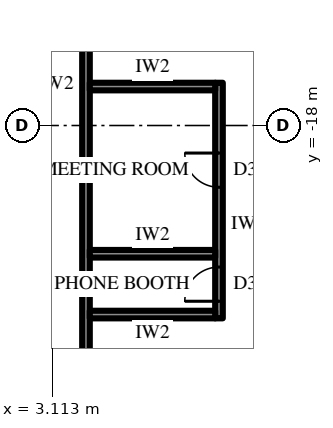
"""IFC4 building model, lengths in metres.
Left out: names, types, materials, properties, quantities, classifications, styles, units other than length and angle.
Written with IfcOpenShell. Run it as: python <this file> out.ifc"""

import sys

from ifc_helpers import new_model, si_unit, direction, frame, frame_2d, origin, place, context, subcontext, project, spatial, rectangle, extrude, element, fill, save


model = new_model("IFC4")
c1 = context("Model", 3, precision=1e-05, world=origin(), true_north=direction((0.0, 1.0)))
c2 = subcontext(c1, "Body", "Model", "MODEL_VIEW")
j1 = project(units=[si_unit("LENGTHUNIT", "METRE"), si_unit("PLANEANGLEUNIT", "RADIAN")], contexts=[c1])
p1 = place(None, origin())
s1 = spatial("IfcSite", under=j1, at=p1, CompositionType="ELEMENT")
p2 = place(p1, origin())
s2 = spatial("IfcBuilding", under=s1, at=p2, CompositionType="ELEMENT")
p3 = place(p2, frame((0.0, 0.0, 219.7)))
s3 = spatial("IfcBuildingStorey", under=s2, at=p3, CompositionType="ELEMENT", Elevation=219.7)
p4 = place(p3, frame((4.0, -12.3, 0.0), z_axis=(0.0, 0.0, 1.0), x_axis=(0.0, -1.0, 0.0)))
e1 = element("IfcWall", 1, at=p4, inside=s3, PredefinedType="PARTITIONING", context=c2, shape_type="SweptSolid", body=[
    extrude(rectangle(XDim=15.35, YDim=0.2, at=frame_2d((7.675, 0.0))), origin(), (0.0, 0.0, 1.0), 4.0),
])
p5 = place(p3, frame((7.5, -16.875, 0.0), z_axis=(0.0, 0.0, 1.0), x_axis=(0.0, -1.0, 0.0)))
e2 = element("IfcWall", 2, at=p5, inside=s3, PredefinedType="PARTITIONING", context=c2, shape_type="SweptSolid", body=[
    extrude(rectangle(XDim=6.2, YDim=0.2, at=frame_2d((3.1, 0.0))), origin(), (0.0, 0.0, 1.0), 4.0),
])
p6 = place(p5, frame((1.85, 0.0, 0.0)))
e3 = element("IfcOpeningElement", 3, at=p6, cuts=e2, PredefinedType="OPENING", context=c2, shape_type="SweptSolid", body=[
    extrude(rectangle(XDim=0.9, YDim=2.2, at=frame_2d((0.45, 1.1))), frame((0.0, 0.11, 0.0), z_axis=(0.0, -1.0, 0.0), x_axis=(1.0, 0.0, 0.0)), (0.0, 0.0, 1.0), 0.22),
])
p7 = place(p5, frame((4.85, 0.0, 0.0)))
e4 = element("IfcOpeningElement", 4, at=p7, cuts=e2, PredefinedType="OPENING", context=c2, shape_type="SweptSolid", body=[
    extrude(rectangle(XDim=0.9, YDim=2.2, at=frame_2d((0.45, 1.1))), frame((0.0, 0.11, 0.0), z_axis=(0.0, -1.0, 0.0), x_axis=(1.0, 0.0, 0.0)), (0.0, 0.0, 1.0), 0.22),
])
for number, where, z_axis, x_axis in (
    (5, (4.1, -16.975, 0.0), (0.0, 0.0, 1.0), (1.0, 0.0, 0.0)),
    (6, (4.1, -21.375, 0.0), (0.0, 0.0, 1.0), (1.0, 0.0, 0.0)),
    (7, (4.1, -22.975, 0.0), (0.0, 0.0, 1.0), (1.0, 0.0, 0.0)),
):
    element("IfcWall", number, at=place(p3, frame(where, z_axis=z_axis, x_axis=x_axis)), inside=s3, PredefinedType="PARTITIONING", context=c2, shape_type="SweptSolid", body=[
        extrude(rectangle(XDim=3.3, YDim=0.2, at=frame_2d((1.65, 0.0))), origin(), (0.0, 0.0, 1.0), 4.0),
    ])
p8 = place(p6, frame((0.9, 0.0, 0.0), z_axis=(0.0, 0.0, 1.0), x_axis=(-1.0, 0.0, 0.0)))
e8 = element("IfcDoor", 8, at=p8, inside=s3, OperationType="SINGLE_SWING_LEFT", PredefinedType="DOOR", context=c2, shape_type="SweptSolid", body=[
    extrude(rectangle(XDim=0.9, YDim=2.2, at=frame_2d((0.45, 1.1))), frame((0.0, 0.025, 0.0), z_axis=(0.0, -1.0, 0.0), x_axis=(1.0, 0.0, 0.0)), (0.0, 0.0, 1.0), 0.05),
])
fill(e3, e8)
p9 = place(p7, frame((0.9, 0.0, 0.0), z_axis=(0.0, 0.0, 1.0), x_axis=(-1.0, 0.0, 0.0)))
e9 = element("IfcDoor", 9, at=p9, inside=s3, OperationType="SINGLE_SWING_RIGHT", PredefinedType="DOOR", context=c2, shape_type="SweptSolid", body=[
    extrude(rectangle(XDim=0.9, YDim=2.2, at=frame_2d((0.45, 1.1))), frame((0.0, 0.025, 0.0), z_axis=(0.0, -1.0, 0.0), x_axis=(1.0, 0.0, 0.0)), (0.0, 0.0, 1.0), 0.05),
])
fill(e4, e9)
save(model, sys.argv[1])
